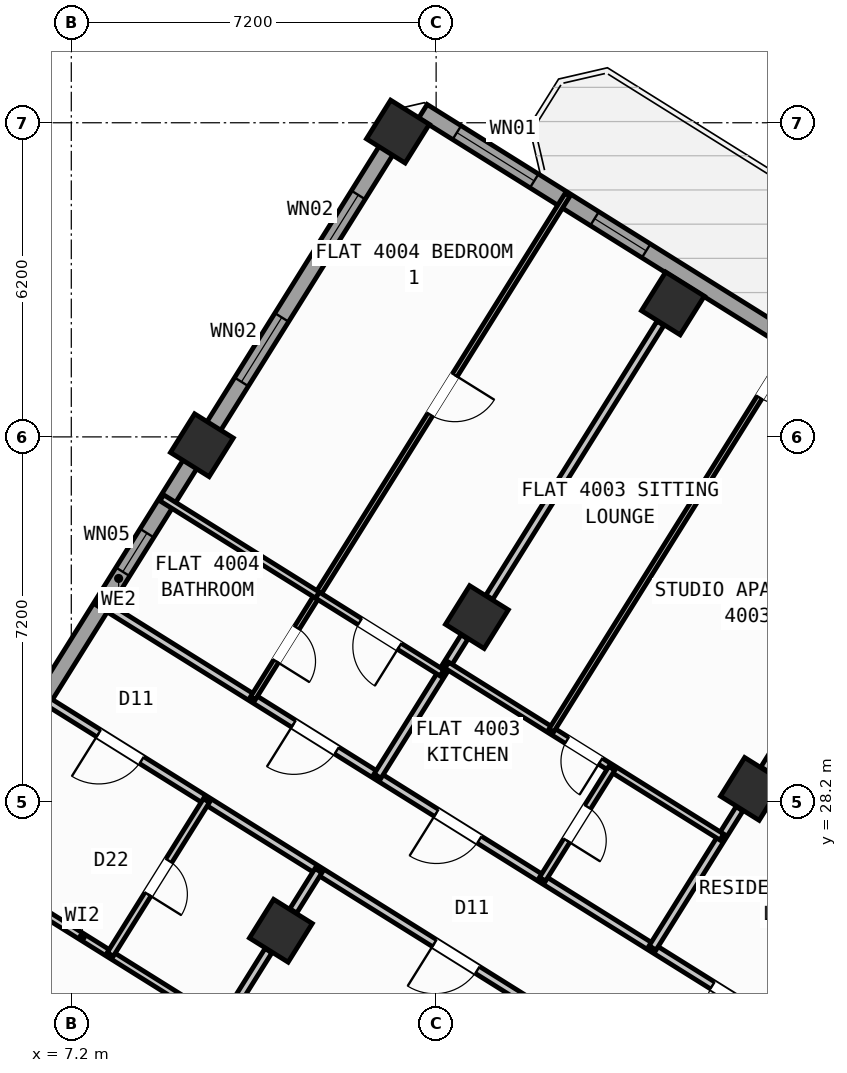
"""IFC4 building model, lengths in metres.
Left out: names, types, materials, properties, quantities, classifications, styles, units other than length and angle.
Written with IfcOpenShell. Run it as: python <this file> out.ifc"""

import sys

from ifc_helpers import new_model, si_unit, direction, frame, frame_2d, origin, origin_2d, place, context, subcontext, project, spatial, rectangle, hollow_rectangle, extrude, source, transform, mapped, element, fill, save


model = new_model("IFC4")
c1 = context("Model", 3, precision=1e-05, world=origin(), true_north=direction((0.0, 1.0)))
c2 = subcontext(c1, "Body", "Model", "MODEL_VIEW")
j1 = project(units=[si_unit("LENGTHUNIT", "METRE"), si_unit("PLANEANGLEUNIT", "RADIAN")], contexts=[c1])
p1 = place(None, origin())
s1 = spatial("IfcSite", under=j1, at=p1, CompositionType="ELEMENT")
p2 = place(p1, origin())
s2 = spatial("IfcBuilding", under=s1, at=p2, CompositionType="ELEMENT")
p3 = place(p2, frame((0.0, 0.0, 158.7)))
s3 = spatial("IfcBuildingStorey", under=s2, at=p3, CompositionType="ELEMENT", Elevation=158.7)
m1 = source(origin(), c2, "Body", "SweptSolid", [
    extrude(hollow_rectangle(XDim=0.9, YDim=0.9, WallThickness=0.036, at=origin_2d()), origin(), (0.0, 0.0, 1.0), 3.6),
])
for number, where, z_axis, x_axis in (
    (1, (20.632, 28.452, 0.0), (0.0, 0.0, 1.0), (-0.848, 0.53, 0.0)),
    (2, (19.073, 38.034, 0.0), (0.0, 0.0, 1.0), (-0.848, 0.53, 0.0)),
    (3, (15.205, 31.844, 0.0), (0.0, 0.0, 1.0), (-0.848, 0.53, 0.0)),
    (4, (11.336, 25.653, 0.0), (0.0, 0.0, 1.0), (-0.848, 0.53, 0.0)),
    (5, (13.646, 41.426, 0.0), (0.0, 0.0, 1.0), (-0.848, 0.53, 0.0)),
    (6, (9.777, 35.235, 0.0), (0.0, 0.0, 1.0), (-0.848, 0.53, 0.0)),
):
    element("IfcColumn", number, at=place(p3, frame(where, z_axis=z_axis, x_axis=x_axis)), inside=s3, PredefinedType="COLUMN", context=c2, shape_type="MappedRepresentation", body=[
        mapped(m1, transform((0.0, 0.0, 0.0), scale=1.0)),
    ])
p4 = place(p3, frame((2.415, 23.452, 0.0), z_axis=(0.0, 0.0, 1.0), x_axis=(0.52991049553, 0.848053575387, 0.0)))
e7 = element("IfcWall", 7, at=p4, inside=s3, PredefinedType="STANDARD", context=c2, shape_type="SweptSolid", body=[
    extrude(rectangle(XDim=21.587, YDim=0.32, at=frame_2d((10.794, 0.0))), origin(), (0.0, 0.0, 1.0), 2.775),
])
p5 = place(p4, frame((1.406, 0.0, 0.8)))
e8 = element("IfcOpeningElement", 8, at=p5, cuts=e7, PredefinedType="OPENING", context=c2, shape_type="SweptSolid", body=[
    extrude(rectangle(XDim=2.1, YDim=1.55, at=frame_2d((1.05, 0.775))), frame((0.0, 0.17, 0.0), z_axis=(0.0, -1.0, 0.0), x_axis=(1.0, 0.0, 0.0)), (0.0, 0.0, 1.0), 0.34),
])
p6 = place(p4, frame((10.949, 0.0, 1.0)))
e9 = element("IfcOpeningElement", 9, at=p6, cuts=e7, PredefinedType="OPENING", context=c2, shape_type="SweptSolid", body=[
    extrude(rectangle(XDim=0.9, YDim=1.25, at=frame_2d((0.45, 0.625))), frame((0.0, 0.17, 0.0), z_axis=(0.0, -1.0, 0.0), x_axis=(1.0, 0.0, 0.0)), (0.0, 0.0, 1.0), 0.34),
])
p7 = place(p4, frame((15.369, 0.0, 0.85)))
e10 = element("IfcOpeningElement", 10, at=p7, cuts=e7, PredefinedType="OPENING", context=c2, shape_type="SweptSolid", body=[
    extrude(rectangle(XDim=1.5, YDim=1.5, at=frame_2d((0.75, 0.75))), frame((0.0, 0.17, 0.0), z_axis=(0.0, -1.0, 0.0), x_axis=(1.0, 0.0, 0.0)), (0.0, 0.0, 1.0), 0.34),
])
p8 = place(p4, frame((18.219, 0.0, 0.85)))
e11 = element("IfcOpeningElement", 11, at=p8, cuts=e7, PredefinedType="OPENING", context=c2, shape_type="SweptSolid", body=[
    extrude(rectangle(XDim=1.5, YDim=1.5, at=frame_2d((0.75, 0.75))), frame((0.0, 0.17, 0.0), z_axis=(0.0, -1.0, 0.0), x_axis=(1.0, 0.0, 0.0)), (0.0, 0.0, 1.0), 0.34),
])
p9 = place(p3, frame((14.138, 41.825, 0.0), z_axis=(0.0, 0.0, 1.0), x_axis=(0.848046498049, -0.529921821731, 0.0)))
e12 = element("IfcWall", 12, at=p9, inside=s3, PredefinedType="STANDARD", context=c2, shape_type="SweptSolid", body=[
    extrude(rectangle(XDim=31.588, YDim=0.32, at=frame_2d((15.794, 0.0))), origin(), (0.0, 0.0, 1.0), 3.35),
])
p10 = place(p9, frame((9.792, 0.0, 0.0)))
e13 = element("IfcOpeningElement", 13, at=p10, cuts=e12, PredefinedType="OPENING", context=c2, shape_type="SweptSolid", body=[
    extrude(rectangle(XDim=1.05, YDim=2.15, at=frame_2d((0.525, 1.075))), frame((0.0, 0.17, 0.0), z_axis=(0.0, -1.0, 0.0), x_axis=(1.0, 0.0, 0.0)), (0.0, 0.0, 1.0), 0.34),
])
p11 = place(p9, frame((0.791, 0.0, 0.85)))
e14 = element("IfcOpeningElement", 14, at=p11, cuts=e12, PredefinedType="OPENING", context=c2, shape_type="SweptSolid", body=[
    extrude(rectangle(XDim=1.8, YDim=1.5, at=frame_2d((0.9, 0.75))), frame((0.0, 0.17, 0.0), z_axis=(0.0, -1.0, 0.0), x_axis=(1.0, 0.0, 0.0)), (0.0, 0.0, 1.0), 0.34),
])
p12 = place(p9, frame((3.996, 0.0, 0.95)))
e15 = element("IfcOpeningElement", 15, at=p12, cuts=e12, PredefinedType="OPENING", context=c2, shape_type="SweptSolid", body=[
    extrude(rectangle(XDim=1.2, YDim=1.4, at=frame_2d((0.6, 0.7))), frame((0.0, 0.17, 0.0), z_axis=(0.0, -1.0, 0.0), x_axis=(1.0, 0.0, 0.0)), (0.0, 0.0, 1.0), 0.34),
])
p13 = place(p9, frame((13.874, 0.0, 0.85)))
e16 = element("IfcOpeningElement", 16, at=p13, cuts=e12, PredefinedType="OPENING", context=c2, shape_type="SweptSolid", body=[
    extrude(rectangle(XDim=1.5, YDim=1.5, at=frame_2d((0.75, 0.75))), frame((0.0, 0.17, 0.0), z_axis=(0.0, -1.0, 0.0), x_axis=(1.0, 0.0, 0.0)), (0.0, 0.0, 1.0), 0.34),
])
p14 = place(p9, frame((17.104, 0.0, 1.0)))
e17 = element("IfcOpeningElement", 17, at=p14, cuts=e12, PredefinedType="OPENING", context=c2, shape_type="SweptSolid", body=[
    extrude(rectangle(XDim=0.9, YDim=1.25, at=frame_2d((0.45, 0.625))), frame((0.0, 0.17, 0.0), z_axis=(0.0, -1.0, 0.0), x_axis=(1.0, 0.0, 0.0)), (0.0, 0.0, 1.0), 0.34),
])
p15 = place(p9, frame((22.144, 0.0, 1.0)))
e18 = element("IfcOpeningElement", 18, at=p15, cuts=e12, PredefinedType="OPENING", context=c2, shape_type="SweptSolid", body=[
    extrude(rectangle(XDim=0.9, YDim=1.25, at=frame_2d((0.45, 0.625))), frame((0.0, 0.17, 0.0), z_axis=(0.0, -1.0, 0.0), x_axis=(1.0, 0.0, 0.0)), (0.0, 0.0, 1.0), 0.34),
])
p16 = place(p9, frame((27.744, 0.0, 1.0)))
e19 = element("IfcOpeningElement", 19, at=p16, cuts=e12, PredefinedType="OPENING", context=c2, shape_type="SweptSolid", body=[
    extrude(rectangle(XDim=0.9, YDim=1.25, at=frame_2d((0.45, 0.625))), frame((0.0, 0.17, 0.0), z_axis=(0.0, -1.0, 0.0), x_axis=(1.0, 0.0, 0.0)), (0.0, 0.0, 1.0), 0.34),
])
p17 = place(p3, frame((21.885, 23.306, 0.0), z_axis=(0.0, 0.0, 1.0), x_axis=(-0.848052408131, 0.529912363569, 0.0)))
e20 = element("IfcWall", 20, at=p17, inside=s3, PredefinedType="PARTITIONING", context=c2, shape_type="SweptSolid", body=[
    extrude(rectangle(XDim=16.73, YDim=0.16, at=frame_2d((8.365, 0.0))), origin(), (0.0, 0.0, 1.0), 3.34),
])
p18 = place(p17, frame((1.395, 0.0, 0.0)))
e21 = element("IfcOpeningElement", 21, at=p18, cuts=e20, PredefinedType="OPENING", context=c2, shape_type="SweptSolid", body=[
    extrude(rectangle(XDim=1.0, YDim=2.1, at=frame_2d((0.5, 1.05))), frame((0.0, 0.09, 0.0), z_axis=(0.0, -1.0, 0.0), x_axis=(1.0, 0.0, 0.0)), (0.0, 0.0, 1.0), 0.18),
])
p19 = place(p17, frame((7.82, 0.0, 0.0)))
e22 = element("IfcOpeningElement", 22, at=p19, cuts=e20, PredefinedType="OPENING", context=c2, shape_type="SweptSolid", body=[
    extrude(rectangle(XDim=1.0, YDim=2.1, at=frame_2d((0.5, 1.05))), frame((0.0, 0.09, 0.0), z_axis=(0.0, -1.0, 0.0), x_axis=(1.0, 0.0, 0.0)), (0.0, 0.0, 1.0), 0.18),
])
p20 = place(p17, frame((11.14, 0.0, 0.0)))
e23 = element("IfcOpeningElement", 23, at=p20, cuts=e20, PredefinedType="OPENING", context=c2, shape_type="SweptSolid", body=[
    extrude(rectangle(XDim=1.0, YDim=2.1, at=frame_2d((0.5, 1.05))), frame((0.0, 0.09, 0.0), z_axis=(0.0, -1.0, 0.0), x_axis=(1.0, 0.0, 0.0)), (0.0, 0.0, 1.0), 0.18),
])
p21 = place(p3, frame((20.719, 21.44, 0.0), z_axis=(0.0, 0.0, 1.0), x_axis=(-0.848048310262, 0.529918921593, 0.0)))
e24 = element("IfcWall", 24, at=p21, inside=s3, PredefinedType="PARTITIONING", context=c2, shape_type="SweptSolid", body=[
    extrude(rectangle(XDim=16.73, YDim=0.16, at=frame_2d((8.365, 0.0))), origin(), (0.0, 0.0, 1.0), 3.34),
])
p22 = place(p21, frame((2.22, 0.0, 0.0)))
e25 = element("IfcOpeningElement", 25, at=p22, cuts=e24, PredefinedType="OPENING", context=c2, shape_type="SweptSolid", body=[
    extrude(rectangle(XDim=0.86, YDim=2.05, at=frame_2d((0.43, 1.025))), frame((0.0, 0.09, 0.0), z_axis=(0.0, -1.0, 0.0), x_axis=(1.0, 0.0, 0.0)), (0.0, 0.0, 1.0), 0.18),
])
p23 = place(p21, frame((6.49, 0.0, 0.0)))
e26 = element("IfcOpeningElement", 26, at=p23, cuts=e24, PredefinedType="OPENING", context=c2, shape_type="SweptSolid", body=[
    extrude(rectangle(XDim=1.0, YDim=2.1, at=frame_2d((0.5, 1.05))), frame((0.0, 0.09, 0.0), z_axis=(0.0, -1.0, 0.0), x_axis=(1.0, 0.0, 0.0)), (0.0, 0.0, 1.0), 0.18),
])
p24 = place(p21, frame((14.304, 0.0, 0.0)))
e27 = element("IfcOpeningElement", 27, at=p24, cuts=e24, PredefinedType="OPENING", context=c2, shape_type="SweptSolid", body=[
    extrude(rectangle(XDim=1.0, YDim=2.1, at=frame_2d((0.5, 1.05))), frame((0.0, 0.09, 0.0), z_axis=(0.0, -1.0, 0.0), x_axis=(1.0, 0.0, 0.0)), (0.0, 0.0, 1.0), 0.18),
])
p25 = place(p3, frame((12.078, 26.84, 0.0), z_axis=(0.0, 0.0, 1.0), x_axis=(-0.529952145338, -0.848027548876, 0.0)))
e28 = element("IfcWall", 28, at=p25, inside=s3, PredefinedType="PARTITIONING", context=c2, shape_type="SweptSolid", body=[
    extrude(rectangle(XDim=0.938, YDim=0.16, at=frame_2d((0.469, 0.0))), origin(), (0.0, 0.0, 1.0), 2.775),
])
p26 = place(p3, frame((11.091, 25.261, 0.0), z_axis=(0.0, 0.0, 1.0), x_axis=(-0.52994257524, -0.848033529377, 0.0)))
e29 = element("IfcWall", 29, at=p26, inside=s3, PredefinedType="PARTITIONING", context=c2, shape_type="SweptSolid", body=[
    extrude(rectangle(XDim=5.451, YDim=0.16, at=frame_2d((2.726, 0.0))), origin(), (0.0, 0.0, 1.0), 2.775),
])
p27 = place(p3, frame((10.181, 23.804, 0.0), z_axis=(0.0, 0.0, 1.0), x_axis=(-0.848065614912, 0.529891227332, 0.0)))
e30 = element("IfcWall", 30, at=p27, inside=s3, PredefinedType="PLUMBINGWALL", context=c2, shape_type="SweptSolid", body=[
    extrude(rectangle(XDim=6.52, YDim=0.14, at=frame_2d((3.26, 0.0))), origin(), (0.0, 0.0, 1.0), 3.34),
])
p28 = place(p27, frame((4.124, 0.0, 0.0)))
e31 = element("IfcOpeningElement", 31, at=p28, cuts=e30, PredefinedType="OPENING", context=c2, shape_type="SweptSolid", body=[
    extrude(rectangle(XDim=0.92, YDim=2.08, at=frame_2d((0.46, 1.04))), frame((0.0, 0.08, 0.0), z_axis=(0.0, -1.0, 0.0), x_axis=(1.0, 0.0, 0.0)), (0.0, 0.0, 1.0), 0.16),
])
p29 = place(p3, frame((9.866, 28.222, 0.0), z_axis=(0.0, 0.0, 1.0), x_axis=(-0.529876336437, -0.84807491891, 0.0)))
e32 = element("IfcWall", 32, at=p29, inside=s3, PredefinedType="PLUMBINGWALL", context=c2, shape_type="SweptSolid", body=[
    extrude(rectangle(XDim=3.58, YDim=0.14, at=frame_2d((1.79, 0.0))), origin(), (0.0, 0.0, 1.0), 3.34),
])
p30 = place(p29, frame((1.4, 0.0, 0.0)))
e33 = element("IfcOpeningElement", 33, at=p30, cuts=e32, PredefinedType="OPENING", context=c2, shape_type="SweptSolid", body=[
    extrude(rectangle(XDim=0.78, YDim=2.05, at=frame_2d((0.39, 1.025))), frame((0.0, 0.08, 0.0), z_axis=(0.0, -1.0, 0.0), x_axis=(1.0, 0.0, 0.0)), (0.0, 0.0, 1.0), 0.16),
])
p31 = place(p3, frame((24.256, 34.251, 0.0), z_axis=(0.0, 0.0, 1.0), x_axis=(-0.529919772691, -0.848047778437, 0.0)))
e34 = element("IfcWall", 34, at=p31, inside=s3, PredefinedType="PARTITIONING", context=c2, shape_type="SweptSolid", body=[
    extrude(rectangle(XDim=6.376, YDim=0.16, at=frame_2d((3.188, 0.0))), origin(), (0.0, 0.0, 1.0), 2.775),
])
p32 = place(p3, frame((20.387, 28.06, 0.0), z_axis=(0.0, 0.0, 1.0), x_axis=(-0.529890499457, -0.848066069705, 0.0)))
e35 = element("IfcWall", 35, at=p32, inside=s3, PredefinedType="PARTITIONING", context=c2, shape_type="SweptSolid", body=[
    extrude(rectangle(XDim=3.238, YDim=0.16, at=frame_2d((1.619, 0.0))), origin(), (0.0, 0.0, 1.0), 2.775),
])
p33 = place(p3, frame((18.828, 37.643, 0.0), z_axis=(0.0, 0.0, 1.0), x_axis=(-0.529930102756, -0.848041323399, 0.0)))
e36 = element("IfcWall", 36, at=p33, inside=s3, PredefinedType="PARTITIONING", context=c2, shape_type="SweptSolid", body=[
    extrude(rectangle(XDim=6.376, YDim=0.16, at=frame_2d((3.188, 0.0))), origin(), (0.0, 0.0, 1.0), 2.775),
])
p34 = place(p3, frame((14.96, 31.452, 0.0), z_axis=(0.0, 0.0, 1.0), x_axis=(-0.529924383291, -0.848044897393, 0.0)))
e37 = element("IfcWall", 37, at=p34, inside=s3, PredefinedType="PARTITIONING", context=c2, shape_type="SweptSolid", body=[
    extrude(rectangle(XDim=3.238, YDim=0.16, at=frame_2d((1.619, 0.0))), origin(), (0.0, 0.0, 1.0), 2.775),
])
p35 = place(p3, frame((20.039, 27.502, 0.0), z_axis=(0.0, 0.0, 1.0), x_axis=(-0.848039019877, 0.529933789039, 0.0)))
e38 = element("IfcWall", 38, at=p35, inside=s3, PredefinedType="PLUMBINGWALL", context=c2, shape_type="SweptSolid", body=[
    extrude(rectangle(XDim=6.4, YDim=0.14, at=frame_2d((3.2, 0.0))), origin(), (0.0, 0.0, 1.0), 3.34),
])
p36 = place(p35, frame((2.824, 0.0, 0.0)))
e39 = element("IfcOpeningElement", 39, at=p36, cuts=e38, PredefinedType="OPENING", context=c2, shape_type="SweptSolid", body=[
    extrude(rectangle(XDim=0.78, YDim=2.05, at=frame_2d((0.39, 1.025))), frame((0.0, 0.08, 0.0), z_axis=(0.0, -1.0, 0.0), x_axis=(1.0, 0.0, 0.0)), (0.0, 0.0, 1.0), 0.16),
])
p37 = place(p3, frame((17.867, 28.859, 0.0), z_axis=(0.0, 0.0, 1.0), x_axis=(-0.529913878929, -0.848051461244, 0.0)))
e40 = element("IfcWall", 40, at=p37, inside=s3, PredefinedType="PLUMBINGWALL", context=c2, shape_type="SweptSolid", body=[
    extrude(rectangle(XDim=2.58, YDim=0.14, at=frame_2d((1.29, 0.0))), origin(), (0.0, 0.0, 1.0), 3.34),
])
p38 = place(p37, frame((0.9, 0.0, 0.0)))
e41 = element("IfcOpeningElement", 41, at=p38, cuts=e40, PredefinedType="OPENING", context=c2, shape_type="SweptSolid", body=[
    extrude(rectangle(XDim=0.78, YDim=2.05, at=frame_2d((0.39, 1.025))), frame((0.0, 0.08, 0.0), z_axis=(0.0, -1.0, 0.0), x_axis=(1.0, 0.0, 0.0)), (0.0, 0.0, 1.0), 0.16),
])
p39 = place(p3, frame((21.517, 37.356, 0.0), z_axis=(0.0, 0.0, 1.0), x_axis=(-0.529919705034, -0.848047820713, 0.0)))
e42 = element("IfcWall", 42, at=p39, inside=s3, PredefinedType="PARTITIONING", context=c2, shape_type="SweptSolid", body=[
    extrude(rectangle(XDim=9.14, YDim=0.11, at=frame_2d((4.57, 0.0))), origin(), (0.0, 0.0, 1.0), 3.34),
])
p40 = place(p39, frame((0.47, 0.0, 0.0)))
e43 = element("IfcOpeningElement", 43, at=p40, cuts=e42, PredefinedType="OPENING", context=c2, shape_type="SweptSolid", body=[
    extrude(rectangle(XDim=0.92, YDim=2.08, at=frame_2d((0.46, 1.04))), frame((0.0, 0.065, 0.0), z_axis=(0.0, -1.0, 0.0), x_axis=(1.0, 0.0, 0.0)), (0.0, 0.0, 1.0), 0.13),
])
p41 = place(p3, frame((16.995, 40.182, 0.0), z_axis=(0.0, 0.0, 1.0), x_axis=(-0.529927783988, -0.848042772363, 0.0)))
e44 = element("IfcWall", 44, at=p41, inside=s3, PredefinedType="PARTITIONING", context=c2, shape_type="SweptSolid", body=[
    extrude(rectangle(XDim=11.72, YDim=0.11, at=frame_2d((5.86, 0.0))), origin(), (0.0, 0.0, 1.0), 3.34),
])
p42 = place(p41, frame((10.08, 0.0, 0.0)))
e45 = element("IfcOpeningElement", 45, at=p42, cuts=e44, PredefinedType="OPENING", context=c2, shape_type="SweptSolid", body=[
    extrude(rectangle(XDim=0.78, YDim=2.05, at=frame_2d((0.39, 1.025))), frame((0.0, 0.065, 0.0), z_axis=(0.0, -1.0, 0.0), x_axis=(1.0, 0.0, 0.0)), (0.0, 0.0, 1.0), 0.13),
])
p43 = place(p41, frame((4.2, 0.0, 0.0)))
e46 = element("IfcOpeningElement", 46, at=p43, cuts=e44, PredefinedType="OPENING", context=c2, shape_type="SweptSolid", body=[
    extrude(rectangle(XDim=0.92, YDim=2.08, at=frame_2d((0.46, 1.04))), frame((0.0, 0.065, 0.0), z_axis=(0.0, -1.0, 0.0), x_axis=(1.0, 0.0, 0.0)), (0.0, 0.0, 1.0), 0.13),
])
p44 = place(p3, frame((14.516, 30.741, 0.0), z_axis=(0.0, 0.0, 1.0), x_axis=(-0.848059786386, 0.529900555496, 0.0)))
e47 = element("IfcWall", 47, at=p44, inside=s3, PredefinedType="PLUMBINGWALL", context=c2, shape_type="SweptSolid", body=[
    extrude(rectangle(XDim=2.9, YDim=0.14, at=frame_2d((1.45, 0.0))), origin(), (0.0, 0.0, 1.0), 3.34),
])
p45 = place(p44, frame((0.99, 0.0, 0.0)))
e48 = element("IfcOpeningElement", 48, at=p45, cuts=e47, PredefinedType="OPENING", context=c2, shape_type="SweptSolid", body=[
    extrude(rectangle(XDim=0.92, YDim=2.08, at=frame_2d((0.46, 1.04))), frame((0.0, 0.08, 0.0), z_axis=(0.0, -1.0, 0.0), x_axis=(1.0, 0.0, 0.0)), (0.0, 0.0, 1.0), 0.16),
])
p46 = place(p3, frame((12.056, 32.278, 0.0), z_axis=(0.0, 0.0, 1.0), x_axis=(-0.848039976902, 0.529932257535, 0.0)))
e49 = element("IfcWall", 49, at=p46, inside=s3, PredefinedType="PLUMBINGWALL", context=c2, shape_type="SweptSolid", body=[
    extrude(rectangle(XDim=3.62, YDim=0.14, at=frame_2d((1.81, 0.0))), origin(), (0.0, 0.0, 1.0), 3.34),
])
m2 = source(origin(), c2, "Body", "SweptSolid", [
    extrude(rectangle(XDim=0.9, YDim=1.25, at=frame_2d((0.45, 0.625))), frame((0.0, 0.03, 0.0), z_axis=(0.0, -1.0, 0.0), x_axis=(1.0, 0.0, 0.0)), (0.0, 0.0, 1.0), 0.06),
])
p47 = place(p6, origin())
e50 = element("IfcWindow", 50, at=p47, inside=s3, PartitioningType="SINGLE_PANEL", PredefinedType="WINDOW", context=c2, shape_type="MappedRepresentation", body=[
    mapped(m2, transform((0.0, 0.0, 0.0), scale=1.0)),
])
fill(e9, e50)
m3 = source(origin(), c2, "Body", "SweptSolid", [
    extrude(rectangle(XDim=1.5, YDim=1.5, at=frame_2d((0.75, 0.75))), frame((0.0, 0.03, 0.0), z_axis=(0.0, -1.0, 0.0), x_axis=(1.0, 0.0, 0.0)), (0.0, 0.0, 1.0), 0.06),
])
p48 = place(p7, origin())
e51 = element("IfcWindow", 51, at=p48, inside=s3, PartitioningType="SINGLE_PANEL", PredefinedType="WINDOW", context=c2, shape_type="MappedRepresentation", body=[
    mapped(m3, transform((0.0, 0.0, 0.0), scale=1.0)),
])
fill(e10, e51)
p49 = place(p8, origin())
e52 = element("IfcWindow", 52, at=p49, inside=s3, PartitioningType="SINGLE_PANEL", PredefinedType="WINDOW", context=c2, shape_type="MappedRepresentation", body=[
    mapped(m3, transform((0.0, 0.0, 0.0), scale=1.0)),
])
fill(e11, e52)
m4 = source(origin(), c2, "Body", "SweptSolid", [
    extrude(rectangle(XDim=1.8, YDim=1.5, at=frame_2d((0.9, 0.75))), frame((0.0, 0.03, 0.0), z_axis=(0.0, -1.0, 0.0), x_axis=(1.0, 0.0, 0.0)), (0.0, 0.0, 1.0), 0.06),
])
p50 = place(p11, origin())
e53 = element("IfcWindow", 53, at=p50, inside=s3, PartitioningType="SINGLE_PANEL", PredefinedType="WINDOW", context=c2, shape_type="MappedRepresentation", body=[
    mapped(m4, transform((0.0, 0.0, 0.0), scale=1.0)),
])
fill(e14, e53)
m5 = source(origin(), c2, "Body", "SweptSolid", [
    extrude(rectangle(XDim=1.2, YDim=1.4, at=frame_2d((0.6, 0.7))), frame((0.0, 0.03, 0.0), z_axis=(0.0, -1.0, 0.0), x_axis=(1.0, 0.0, 0.0)), (0.0, 0.0, 1.0), 0.06),
])
p51 = place(p12, origin())
e54 = element("IfcWindow", 54, at=p51, inside=s3, PartitioningType="SINGLE_PANEL", PredefinedType="WINDOW", context=c2, shape_type="MappedRepresentation", body=[
    mapped(m5, transform((0.0, 0.0, 0.0), scale=1.0)),
])
fill(e15, e54)
m6 = source(origin(), c2, "Body", "SweptSolid", [
    extrude(rectangle(XDim=1.0, YDim=2.1, at=frame_2d((0.5, 1.05))), frame((0.0, 0.025, 0.0), z_axis=(0.0, -1.0, 0.0), x_axis=(1.0, 0.0, 0.0)), (0.0, 0.0, 1.0), 0.05),
])
p52 = place(p23, origin())
e55 = element("IfcDoor", 55, at=p52, inside=s3, OperationType="SINGLE_SWING_RIGHT", PredefinedType="DOOR", context=c2, shape_type="MappedRepresentation", body=[
    mapped(m6, transform((0.0, 0.0, 0.0), scale=1.0)),
])
fill(e26, e55)
p53 = place(p24, origin())
e56 = element("IfcDoor", 56, at=p53, inside=s3, OperationType="SINGLE_SWING_RIGHT", PredefinedType="DOOR", context=c2, shape_type="MappedRepresentation", body=[
    mapped(m6, transform((0.0, 0.0, 0.0), scale=1.0)),
])
fill(e27, e56)
m7 = source(origin(), c2, "Body", "SweptSolid", [
    extrude(rectangle(XDim=0.78, YDim=2.05, at=frame_2d((0.39, 1.025))), frame((0.0, 0.025, 0.0), z_axis=(0.0, -1.0, 0.0), x_axis=(1.0, 0.0, 0.0)), (0.0, 0.0, 1.0), 0.05),
])
p54 = place(p30, origin())
e57 = element("IfcDoor", 57, at=p54, inside=s3, OperationType="SINGLE_SWING_RIGHT", PredefinedType="DOOR", context=c2, shape_type="MappedRepresentation", body=[
    mapped(m7, transform((0.0, 0.0, 0.0), scale=1.0)),
])
fill(e33, e57)
p55 = place(p18, origin())
e58 = element("IfcDoor", 58, at=p55, inside=s3, OperationType="SINGLE_SWING_LEFT", PredefinedType="DOOR", context=c2, shape_type="MappedRepresentation", body=[
    mapped(m6, transform((0.0, 0.0, 0.0), scale=1.0)),
])
fill(e21, e58)
m8 = source(origin(), c2, "Body", "SweptSolid", [
    extrude(rectangle(XDim=0.92, YDim=2.08, at=frame_2d((0.46, 1.04))), frame((0.0, 0.025, 0.0), z_axis=(0.0, -1.0, 0.0), x_axis=(1.0, 0.0, 0.0)), (0.0, 0.0, 1.0), 0.05),
])
p56 = place(p40, origin())
e59 = element("IfcDoor", 59, at=p56, inside=s3, OperationType="SINGLE_SWING_LEFT", PredefinedType="DOOR", context=c2, shape_type="MappedRepresentation", body=[
    mapped(m8, transform((0.0, 0.0, 0.0), scale=1.0)),
])
fill(e43, e59)
p57 = place(p19, origin())
e60 = element("IfcDoor", 60, at=p57, inside=s3, OperationType="SINGLE_SWING_RIGHT", PredefinedType="DOOR", context=c2, shape_type="MappedRepresentation", body=[
    mapped(m6, transform((0.0, 0.0, 0.0), scale=1.0)),
])
fill(e22, e60)
p58 = place(p36, origin())
e61 = element("IfcDoor", 61, at=p58, inside=s3, OperationType="SINGLE_SWING_LEFT", PredefinedType="DOOR", context=c2, shape_type="MappedRepresentation", body=[
    mapped(m7, transform((0.0, 0.0, 0.0), scale=1.0)),
])
fill(e39, e61)
p59 = place(p38, origin())
e62 = element("IfcDoor", 62, at=p59, inside=s3, OperationType="SINGLE_SWING_RIGHT", PredefinedType="DOOR", context=c2, shape_type="MappedRepresentation", body=[
    mapped(m7, transform((0.0, 0.0, 0.0), scale=1.0)),
])
fill(e41, e62)
p60 = place(p20, origin())
e63 = element("IfcDoor", 63, at=p60, inside=s3, OperationType="SINGLE_SWING_RIGHT", PredefinedType="DOOR", context=c2, shape_type="MappedRepresentation", body=[
    mapped(m6, transform((0.0, 0.0, 0.0), scale=1.0)),
])
fill(e23, e63)
p61 = place(p45, origin())
e64 = element("IfcDoor", 64, at=p61, inside=s3, OperationType="SINGLE_SWING_LEFT", PredefinedType="DOOR", context=c2, shape_type="MappedRepresentation", body=[
    mapped(m8, transform((0.0, 0.0, 0.0), scale=1.0)),
])
fill(e48, e64)
p62 = place(p42, origin())
e65 = element("IfcDoor", 65, at=p62, inside=s3, OperationType="SINGLE_SWING_RIGHT", PredefinedType="DOOR", context=c2, shape_type="MappedRepresentation", body=[
    mapped(m7, transform((0.0, 0.0, 0.0), scale=1.0)),
])
fill(e45, e65)
p63 = place(p43, origin())
e66 = element("IfcDoor", 66, at=p63, inside=s3, OperationType="SINGLE_SWING_LEFT", PredefinedType="DOOR", context=c2, shape_type="MappedRepresentation", body=[
    mapped(m8, transform((0.0, 0.0, 0.0), scale=1.0)),
])
fill(e46, e66)
save(model, sys.argv[1])
